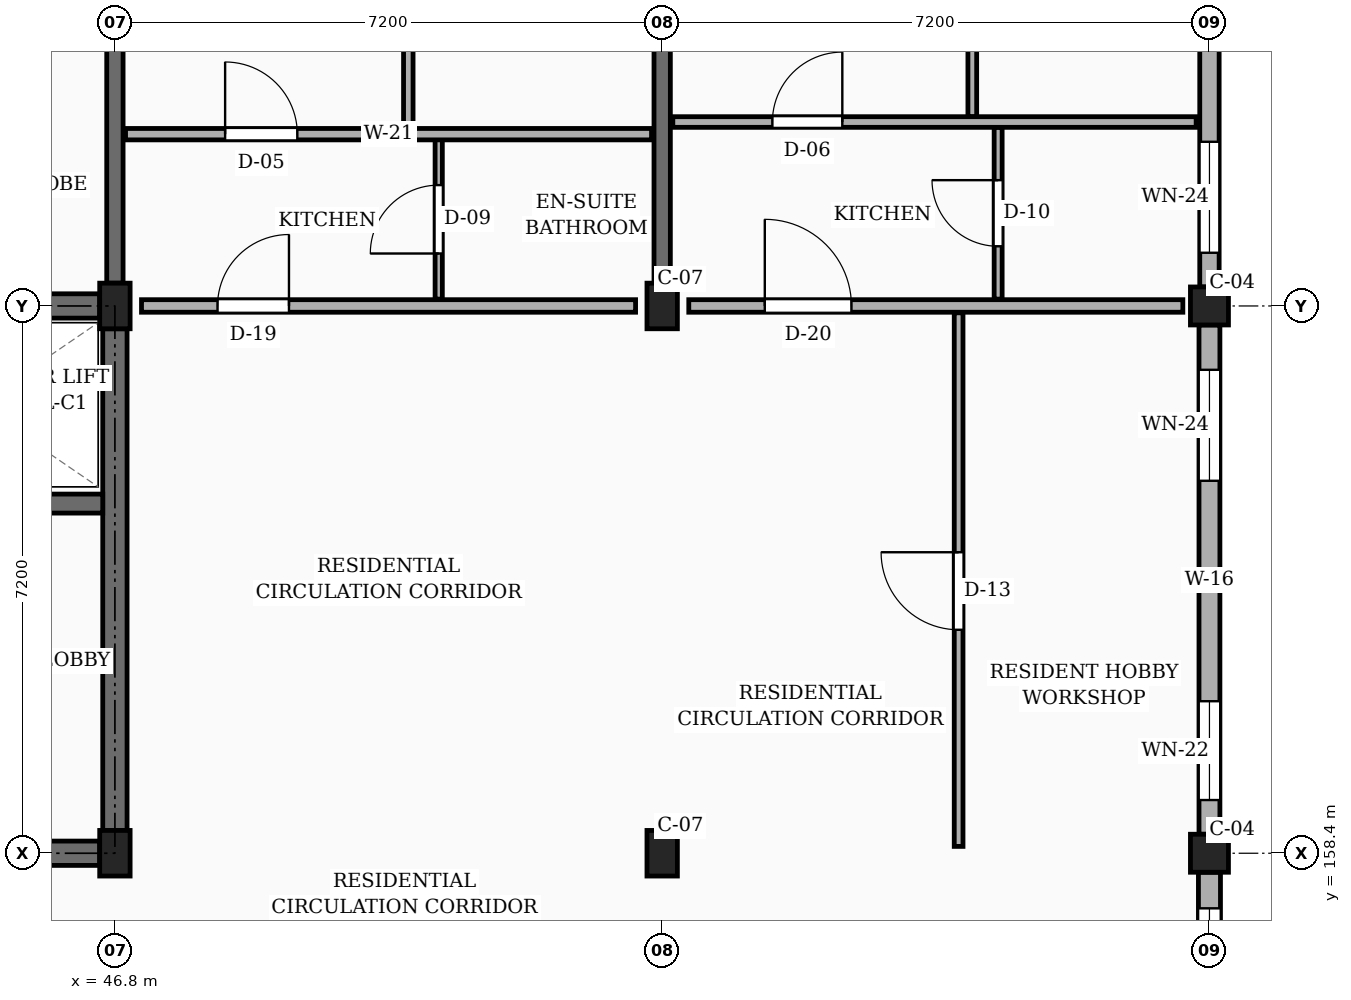
"""IFC4 building model, lengths in metres.
Left out: names, types, materials, properties, quantities, classifications, styles, units other than length and angle.
Written with IfcOpenShell. Run it as: python <this file> out.ifc"""

import sys

from ifc_helpers import new_model, si_unit, direction, frame, frame_2d, origin, origin_2d, place, context, subcontext, project, spatial, rectangle, extrude, element, fill, save


model = new_model("IFC4")
c1 = context("Model", 3, precision=1e-05, world=origin(), true_north=direction((0.0, 1.0)))
c2 = subcontext(c1, "Body", "Model", "MODEL_VIEW")
j1 = project(units=[si_unit("LENGTHUNIT", "METRE"), si_unit("PLANEANGLEUNIT", "RADIAN")], contexts=[c1])
p1 = place(None, origin())
s1 = spatial("IfcSite", under=j1, at=p1, CompositionType="ELEMENT")
p2 = place(p1, origin())
s2 = spatial("IfcBuilding", under=s1, at=p2, CompositionType="ELEMENT")
p3 = place(p2, frame((0.0, 0.0, 29.7)))
s3 = spatial("IfcBuildingStorey", under=s2, at=p3, CompositionType="ELEMENT", Elevation=29.7)
for number, where, z_axis, x_axis in (
    (1, (46.8, 158.4, 0.0), (0.0, 0.0, 1.0), (1.0, 0.0, 0.0)),
    (2, (46.8, 165.6, 0.0), (0.0, 0.0, 1.0), (1.0, 0.0, 0.0)),
    (3, (54.0, 158.4, 0.0), (0.0, 0.0, 1.0), (1.0, 0.0, 0.0)),
    (4, (54.0, 165.6, 0.0), (0.0, 0.0, 1.0), (1.0, 0.0, 0.0)),
):
    element("IfcColumn", number, at=place(p3, frame(where, z_axis=z_axis, x_axis=x_axis)), inside=s3, PredefinedType="COLUMN", context=c2, shape_type="SweptSolid", body=[
        extrude(rectangle(XDim=0.4, YDim=0.6, at=origin_2d()), origin(), (0.0, 0.0, 1.0), 3.15),
    ])
for number, where, z_axis, x_axis in (
    (5, (61.2, 158.4, 0.0), (0.0, 0.0, 1.0), (1.0, 0.0, 0.0)),
    (6, (61.2, 165.6, 0.0), (0.0, 0.0, 1.0), (1.0, 0.0, 0.0)),
):
    element("IfcColumn", number, at=place(p3, frame(where, z_axis=z_axis, x_axis=x_axis)), inside=s3, PredefinedType="COLUMN", context=c2, shape_type="SweptSolid", body=[
        extrude(rectangle(XDim=0.5, YDim=0.5, at=origin_2d()), origin(), (0.0, 0.0, 1.0), 3.15),
    ])
for number, where, z_axis, x_axis in (
    (7, (46.8, 165.9, 0.0), (0.0, 0.0, 1.0), (0.0, 1.0, 0.0)),
    (8, (54.0, 165.9, 0.0), (0.0, 0.0, 1.0), (0.0, 1.0, 0.0)),
):
    element("IfcWall", number, at=place(p3, frame(where, z_axis=z_axis, x_axis=x_axis)), inside=s3, PredefinedType="SOLIDWALL", context=c2, shape_type="SweptSolid", body=[
        extrude(rectangle(XDim=6.65, YDim=0.215, at=frame_2d((3.325, 0.0))), origin(), (0.0, 0.0, 1.0), 2.185),
    ])
p4 = place(p3, frame((61.2, 151.45, 0.0), z_axis=(0.0, 0.0, 1.0), x_axis=(0.0, 1.0, 0.0)))
e9 = element("IfcWall", 9, at=p4, inside=s3, PredefinedType="SOLIDWALL", context=c2, shape_type="SweptSolid", body=[
    extrude(rectangle(XDim=6.7, YDim=0.29, at=frame_2d((3.35, 0.0))), origin(), (0.0, 0.0, 1.0), 2.455),
])
p5 = place(p4, frame((0.49, 0.0, 0.78)))
e10 = element("IfcOpeningElement", 10, at=p5, cuts=e9, PredefinedType="OPENING", context=c2, shape_type="SweptSolid", body=[
    extrude(rectangle(XDim=1.06, YDim=1.36, at=frame_2d((0.53, 0.68))), frame((0.0, 0.155, 0.0), z_axis=(0.0, -1.0, 0.0), x_axis=(1.0, 0.0, 0.0)), (0.0, 0.0, 1.0), 0.31),
])
p6 = place(p4, frame((2.765, 0.0, 0.78)))
e11 = element("IfcOpeningElement", 11, at=p6, cuts=e9, PredefinedType="OPENING", context=c2, shape_type="SweptSolid", body=[
    extrude(rectangle(XDim=1.22, YDim=1.36, at=frame_2d((0.61, 0.68))), frame((0.0, 0.155, 0.0), z_axis=(0.0, -1.0, 0.0), x_axis=(1.0, 0.0, 0.0)), (0.0, 0.0, 1.0), 0.31),
])
p7 = place(p4, frame((5.185, 0.0, 0.78)))
e12 = element("IfcOpeningElement", 12, at=p7, cuts=e9, PredefinedType="OPENING", context=c2, shape_type="SweptSolid", body=[
    extrude(rectangle(XDim=1.04, YDim=1.26, at=frame_2d((0.52, 0.63))), frame((0.0, 0.155, 0.0), z_axis=(0.0, -1.0, 0.0), x_axis=(1.0, 0.0, 0.0)), (0.0, 0.0, 1.0), 0.31),
])
p8 = place(p3, frame((61.2, 158.65, 0.0), z_axis=(0.0, 0.0, 1.0), x_axis=(0.0, 1.0, 0.0)))
e13 = element("IfcWall", 13, at=p8, inside=s3, PredefinedType="SOLIDWALL", context=c2, shape_type="SweptSolid", body=[
    extrude(rectangle(XDim=6.7, YDim=0.275, at=frame_2d((3.35, 0.0))), origin(), (0.0, 0.0, 1.0), 2.455),
])
p9 = place(p8, frame((0.45, 0.0, 0.78)))
e14 = element("IfcOpeningElement", 14, at=p9, cuts=e13, PredefinedType="OPENING", context=c2, shape_type="SweptSolid", body=[
    extrude(rectangle(XDim=1.3, YDim=1.36, at=frame_2d((0.65, 0.68))), frame((0.0, 0.147, 0.0), z_axis=(0.0, -1.0, 0.0), x_axis=(1.0, 0.0, 0.0)), (0.0, 0.0, 1.0), 0.295),
])
p10 = place(p8, frame((4.65, 0.0, 0.78)))
e15 = element("IfcOpeningElement", 15, at=p10, cuts=e13, PredefinedType="OPENING", context=c2, shape_type="SweptSolid", body=[
    extrude(rectangle(XDim=1.46, YDim=1.36, at=frame_2d((0.73, 0.68))), frame((0.0, 0.147, 0.0), z_axis=(0.0, -1.0, 0.0), x_axis=(1.0, 0.0, 0.0)), (0.0, 0.0, 1.0), 0.295),
])
p11 = place(p3, frame((61.2, 165.85, 0.0), z_axis=(0.0, 0.0, 1.0), x_axis=(0.0, 1.0, 0.0)))
e16 = element("IfcWall", 16, at=p11, inside=s3, PredefinedType="SOLIDWALL", context=c2, shape_type="SweptSolid", body=[
    extrude(rectangle(XDim=6.7, YDim=0.255, at=frame_2d((3.35, 0.0))), origin(), (0.0, 0.0, 1.0), 2.455),
])
p12 = place(p11, frame((0.45, 0.0, 0.78)))
e17 = element("IfcOpeningElement", 17, at=p12, cuts=e16, PredefinedType="OPENING", context=c2, shape_type="SweptSolid", body=[
    extrude(rectangle(XDim=1.46, YDim=1.36, at=frame_2d((0.73, 0.68))), frame((0.0, 0.137, 0.0), z_axis=(0.0, -1.0, 0.0), x_axis=(1.0, 0.0, 0.0)), (0.0, 0.0, 1.0), 0.275),
])
p13 = place(p11, frame((4.65, 0.0, 0.78)))
e18 = element("IfcOpeningElement", 18, at=p13, cuts=e16, PredefinedType="OPENING", context=c2, shape_type="SweptSolid", body=[
    extrude(rectangle(XDim=1.05, YDim=1.44, at=frame_2d((0.525, 0.72))), frame((0.0, 0.137, 0.0), z_axis=(0.0, -1.0, 0.0), x_axis=(1.0, 0.0, 0.0)), (0.0, 0.0, 1.0), 0.275),
])
p14 = place(p3, frame((39.8, 165.6, 0.0), z_axis=(0.0, 0.0, 1.0), x_axis=(1.0, 0.0, 0.0)))
e19 = element("IfcWall", 19, at=p14, inside=s3, PredefinedType="SHEAR", context=c2, shape_type="SweptSolid", body=[
    extrude(rectangle(XDim=6.8, YDim=0.32, at=frame_2d((3.4, 0.0))), origin(), (0.0, 0.0, 1.0), 2.885),
])
p15 = place(p3, frame((46.8, 158.7, 0.0), z_axis=(0.0, 0.0, 1.0), x_axis=(0.0, 1.0, 0.0)))
e20 = element("IfcWall", 20, at=p15, inside=s3, PredefinedType="SHEAR", context=c2, shape_type="SweptSolid", body=[
    extrude(rectangle(XDim=6.6, YDim=0.32, at=frame_2d((3.3, 0.0))), origin(), (0.0, 0.0, 1.0), 2.885),
])
p16 = place(p3, frame((39.8, 158.4, 0.0), z_axis=(0.0, 0.0, 1.0), x_axis=(1.0, 0.0, 0.0)))
e21 = element("IfcWall", 21, at=p16, inside=s3, PredefinedType="SHEAR", context=c2, shape_type="SweptSolid", body=[
    extrude(rectangle(XDim=6.8, YDim=0.32, at=frame_2d((3.4, 0.0))), origin(), (0.0, 0.0, 1.0), 2.885),
])
p17 = place(p16, frame((4.55, 0.0, 0.0)))
e22 = element("IfcOpeningElement", 22, at=p17, cuts=e21, PredefinedType="OPENING", context=c2, shape_type="SweptSolid", body=[
    extrude(rectangle(XDim=1.1, YDim=2.15, at=frame_2d((0.55, 1.075))), frame((0.0, 0.17, 0.0), z_axis=(0.0, -1.0, 0.0), x_axis=(1.0, 0.0, 0.0)), (0.0, 0.0, 1.0), 0.34),
])
p18 = place(p3, frame((43.325, 163.0, 0.0), z_axis=(0.0, 0.0, 1.0), x_axis=(1.0, 0.0, 0.0)))
e23 = element("IfcWall", 23, at=p18, inside=s3, PredefinedType="SHEAR", context=c2, shape_type="SweptSolid", body=[
    extrude(rectangle(XDim=3.315, YDim=0.25, at=frame_2d((1.657, 0.0))), origin(), (0.0, 0.0, 1.0), 2.885),
])
p19 = place(p18, frame((1.1, 0.0, 0.0)))
e24 = element("IfcOpeningElement", 24, at=p19, cuts=e23, PredefinedType="OPENING", context=c2, shape_type="SweptSolid", body=[
    extrude(rectangle(XDim=1.0, YDim=2.2, at=frame_2d((0.5, 1.1))), frame((0.0, 0.135, 0.0), z_axis=(0.0, -1.0, 0.0), x_axis=(1.0, 0.0, 0.0)), (0.0, 0.0, 1.0), 0.27),
])
p20 = place(p3, frame((47.15, 165.6, 0.0), z_axis=(0.0, 0.0, 1.0), x_axis=(1.0, 0.0, 0.0)))
e25 = element("IfcWall", 25, at=p20, inside=s3, PredefinedType="PARTITIONING", context=c2, shape_type="SweptSolid", body=[
    extrude(rectangle(XDim=6.5, YDim=0.165, at=frame_2d((3.25, 0.0))), origin(), (0.0, 0.0, 1.0), 2.32),
])
p21 = place(p20, frame((1.0, 0.0, 0.0)))
e26 = element("IfcOpeningElement", 26, at=p21, cuts=e25, PredefinedType="OPENING", context=c2, shape_type="SweptSolid", body=[
    extrude(rectangle(XDim=0.94, YDim=2.12, at=frame_2d((0.47, 1.06))), frame((0.0, 0.093, 0.0), z_axis=(0.0, -1.0, 0.0), x_axis=(1.0, 0.0, 0.0)), (0.0, 0.0, 1.0), 0.185),
])
p22 = place(p3, frame((54.35, 165.6, 0.0), z_axis=(0.0, 0.0, 1.0), x_axis=(1.0, 0.0, 0.0)))
e27 = element("IfcWall", 27, at=p22, inside=s3, PredefinedType="PARTITIONING", context=c2, shape_type="SweptSolid", body=[
    extrude(rectangle(XDim=6.5, YDim=0.165, at=frame_2d((3.25, 0.0))), origin(), (0.0, 0.0, 1.0), 2.32),
])
p23 = place(p22, frame((1.0, 0.0, 0.0)))
e28 = element("IfcOpeningElement", 28, at=p23, cuts=e27, PredefinedType="OPENING", context=c2, shape_type="SweptSolid", body=[
    extrude(rectangle(XDim=1.14, YDim=2.18, at=frame_2d((0.57, 1.09))), frame((0.0, 0.093, 0.0), z_axis=(0.0, -1.0, 0.0), x_axis=(1.0, 0.0, 0.0)), (0.0, 0.0, 1.0), 0.185),
])
p24 = place(p3, frame((50.66, 167.93, 0.0), z_axis=(0.0, 0.0, 1.0), x_axis=(0.0, 1.0, 0.0)))
e29 = element("IfcWall", 29, at=p24, inside=s3, PredefinedType="PARTITIONING", context=c2, shape_type="SweptSolid", body=[
    extrude(rectangle(XDim=4.695, YDim=0.125, at=frame_2d((2.348, 0.0))), origin(), (0.0, 0.0, 1.0), 2.32),
])
p25 = place(p24, frame((1.897, 0.0, 0.0)))
e30 = element("IfcOpeningElement", 30, at=p25, cuts=e29, PredefinedType="OPENING", context=c2, shape_type="SweptSolid", body=[
    extrude(rectangle(XDim=0.9, YDim=2.1, at=frame_2d((0.45, 1.05))), frame((0.0, 0.073, 0.0), z_axis=(0.0, -1.0, 0.0), x_axis=(1.0, 0.0, 0.0)), (0.0, 0.0, 1.0), 0.145),
])
p26 = place(p3, frame((51.06, 165.69, 0.0), z_axis=(0.0, 0.0, 1.0), x_axis=(0.0, 1.0, 0.0)))
e31 = element("IfcWall", 31, at=p26, inside=s3, PredefinedType="PARTITIONING", context=c2, shape_type="SweptSolid", body=[
    extrude(rectangle(XDim=2.1, YDim=0.095, at=frame_2d((1.05, 0.0))), origin(), (0.0, 0.0, 1.0), 2.32),
])
p27 = place(p26, frame((0.6, 0.0, 0.0)))
e32 = element("IfcOpeningElement", 32, at=p27, cuts=e31, PredefinedType="OPENING", context=c2, shape_type="SweptSolid", body=[
    extrude(rectangle(XDim=0.9, YDim=2.05, at=frame_2d((0.45, 1.025))), frame((0.0, 0.058, 0.0), z_axis=(0.0, -1.0, 0.0), x_axis=(1.0, 0.0, 0.0)), (0.0, 0.0, 1.0), 0.115),
])
p28 = place(p3, frame((46.94, 167.86, 0.0), z_axis=(0.0, 0.0, 1.0), x_axis=(1.0, 0.0, 0.0)))
e33 = element("IfcWall", 33, at=p28, inside=s3, PredefinedType="PARTITIONING", context=c2, shape_type="SweptSolid", body=[
    extrude(rectangle(XDim=6.92, YDim=0.15, at=frame_2d((3.46, 0.0))), origin(), (0.0, 0.0, 1.0), 2.32),
])
p29 = place(p28, frame((1.31, 0.0, 0.0)))
e34 = element("IfcOpeningElement", 34, at=p29, cuts=e33, PredefinedType="OPENING", context=c2, shape_type="SweptSolid", body=[
    extrude(rectangle(XDim=0.95, YDim=2.1, at=frame_2d((0.475, 1.05))), frame((0.0, 0.085, 0.0), z_axis=(0.0, -1.0, 0.0), x_axis=(1.0, 0.0, 0.0)), (0.0, 0.0, 1.0), 0.17),
])
p30 = place(p3, frame((57.9, 158.49, 0.0), z_axis=(0.0, 0.0, 1.0), x_axis=(0.0, 1.0, 0.0)))
e35 = element("IfcWall", 35, at=p30, inside=s3, PredefinedType="PARTITIONING", context=c2, shape_type="SweptSolid", body=[
    extrude(rectangle(XDim=7.02, YDim=0.115, at=frame_2d((3.51, 0.0))), origin(), (0.0, 0.0, 1.0), 2.32),
])
p31 = place(p30, frame((2.85, 0.0, 0.0)))
e36 = element("IfcOpeningElement", 36, at=p31, cuts=e35, PredefinedType="OPENING", context=c2, shape_type="SweptSolid", body=[
    extrude(rectangle(XDim=1.02, YDim=2.15, at=frame_2d((0.51, 1.075))), frame((0.0, 0.067, 0.0), z_axis=(0.0, -1.0, 0.0), x_axis=(1.0, 0.0, 0.0)), (0.0, 0.0, 1.0), 0.135),
])
p32 = place(p3, frame((58.08, 168.09, 0.0), z_axis=(0.0, 0.0, 1.0), x_axis=(0.0, 1.0, 0.0)))
e37 = element("IfcWall", 37, at=p32, inside=s3, PredefinedType="PARTITIONING", context=c2, shape_type="SweptSolid", body=[
    extrude(rectangle(XDim=4.535, YDim=0.115, at=frame_2d((2.268, 0.0))), origin(), (0.0, 0.0, 1.0), 2.32),
])
p33 = place(p32, frame((1.827, 0.0, 0.0)))
e38 = element("IfcOpeningElement", 38, at=p33, cuts=e37, PredefinedType="OPENING", context=c2, shape_type="SweptSolid", body=[
    extrude(rectangle(XDim=0.88, YDim=2.08, at=frame_2d((0.44, 1.04))), frame((0.0, 0.067, 0.0), z_axis=(0.0, -1.0, 0.0), x_axis=(1.0, 0.0, 0.0)), (0.0, 0.0, 1.0), 0.135),
])
p34 = place(p3, frame((58.42, 165.69, 0.0), z_axis=(0.0, 0.0, 1.0), x_axis=(0.0, 1.0, 0.0)))
e39 = element("IfcWall", 39, at=p34, inside=s3, PredefinedType="PARTITIONING", context=c2, shape_type="SweptSolid", body=[
    extrude(rectangle(XDim=2.26, YDim=0.105, at=frame_2d((1.13, 0.0))), origin(), (0.0, 0.0, 1.0), 2.32),
])
p35 = place(p34, frame((0.695, 0.0, 0.0)))
e40 = element("IfcOpeningElement", 40, at=p35, cuts=e39, PredefinedType="OPENING", context=c2, shape_type="SweptSolid", body=[
    extrude(rectangle(XDim=0.87, YDim=2.05, at=frame_2d((0.435, 1.025))), frame((0.0, 0.062, 0.0), z_axis=(0.0, -1.0, 0.0), x_axis=(1.0, 0.0, 0.0)), (0.0, 0.0, 1.0), 0.125),
])
p36 = place(p3, frame((54.14, 168.02, 0.0), z_axis=(0.0, 0.0, 1.0), x_axis=(1.0, 0.0, 0.0)))
e41 = element("IfcWall", 41, at=p36, inside=s3, PredefinedType="PARTITIONING", context=c2, shape_type="SweptSolid", body=[
    extrude(rectangle(XDim=6.885, YDim=0.14, at=frame_2d((3.442, 0.0))), origin(), (0.0, 0.0, 1.0), 2.32),
])
p37 = place(p36, frame((1.31, 0.0, 0.0)))
e42 = element("IfcOpeningElement", 42, at=p37, cuts=e41, PredefinedType="OPENING", context=c2, shape_type="SweptSolid", body=[
    extrude(rectangle(XDim=0.92, YDim=2.1, at=frame_2d((0.46, 1.05))), frame((0.0, 0.08, 0.0), z_axis=(0.0, -1.0, 0.0), x_axis=(1.0, 0.0, 0.0)), (0.0, 0.0, 1.0), 0.16),
])
p38 = place(p7, origin())
e43 = element("IfcWindow", 43, at=p38, inside=s3, PartitioningType="SINGLE_PANEL", PredefinedType="WINDOW", context=c2, shape_type="SweptSolid", body=[
    extrude(rectangle(XDim=1.04, YDim=1.26, at=frame_2d((0.52, 0.63))), frame((0.0, 0.03, 0.0), z_axis=(0.0, -1.0, 0.0), x_axis=(1.0, 0.0, 0.0)), (0.0, 0.0, 1.0), 0.06),
])
fill(e12, e43)
p39 = place(p9, origin())
e44 = element("IfcWindow", 44, at=p39, inside=s3, PartitioningType="SINGLE_PANEL", PredefinedType="WINDOW", context=c2, shape_type="SweptSolid", body=[
    extrude(rectangle(XDim=1.3, YDim=1.36, at=frame_2d((0.65, 0.68))), frame((0.0, 0.03, 0.0), z_axis=(0.0, -1.0, 0.0), x_axis=(1.0, 0.0, 0.0)), (0.0, 0.0, 1.0), 0.06),
])
fill(e14, e44)
p40 = place(p10, origin())
e45 = element("IfcWindow", 45, at=p40, inside=s3, PartitioningType="SINGLE_PANEL", PredefinedType="WINDOW", context=c2, shape_type="SweptSolid", body=[
    extrude(rectangle(XDim=1.46, YDim=1.36, at=frame_2d((0.73, 0.68))), frame((0.0, 0.03, 0.0), z_axis=(0.0, -1.0, 0.0), x_axis=(1.0, 0.0, 0.0)), (0.0, 0.0, 1.0), 0.06),
])
fill(e15, e45)
p41 = place(p12, origin())
e46 = element("IfcWindow", 46, at=p41, inside=s3, PartitioningType="SINGLE_PANEL", PredefinedType="WINDOW", context=c2, shape_type="SweptSolid", body=[
    extrude(rectangle(XDim=1.46, YDim=1.36, at=frame_2d((0.73, 0.68))), frame((0.0, 0.03, 0.0), z_axis=(0.0, -1.0, 0.0), x_axis=(1.0, 0.0, 0.0)), (0.0, 0.0, 1.0), 0.06),
])
fill(e17, e46)
p42 = place(p21, origin())
e47 = element("IfcDoor", 47, at=p42, inside=s3, OperationType="SINGLE_SWING_RIGHT", PredefinedType="DOOR", context=c2, shape_type="SweptSolid", body=[
    extrude(rectangle(XDim=0.94, YDim=2.12, at=frame_2d((0.47, 1.06))), frame((0.0, 0.025, 0.0), z_axis=(0.0, -1.0, 0.0), x_axis=(1.0, 0.0, 0.0)), (0.0, 0.0, 1.0), 0.05),
])
fill(e26, e47)
p43 = place(p23, origin())
e48 = element("IfcDoor", 48, at=p43, inside=s3, OperationType="SINGLE_SWING_LEFT", PredefinedType="DOOR", context=c2, shape_type="SweptSolid", body=[
    extrude(rectangle(XDim=1.14, YDim=2.18, at=frame_2d((0.57, 1.09))), frame((0.0, 0.025, 0.0), z_axis=(0.0, -1.0, 0.0), x_axis=(1.0, 0.0, 0.0)), (0.0, 0.0, 1.0), 0.05),
])
fill(e28, e48)
p44 = place(p27, origin())
e49 = element("IfcDoor", 49, at=p44, inside=s3, OperationType="SINGLE_SWING_LEFT", PredefinedType="DOOR", context=c2, shape_type="SweptSolid", body=[
    extrude(rectangle(XDim=0.9, YDim=2.05, at=frame_2d((0.45, 1.025))), frame((0.0, 0.025, 0.0), z_axis=(0.0, -1.0, 0.0), x_axis=(1.0, 0.0, 0.0)), (0.0, 0.0, 1.0), 0.05),
])
fill(e32, e49)
p45 = place(p29, origin())
e50 = element("IfcDoor", 50, at=p45, inside=s3, OperationType="SINGLE_SWING_LEFT", PredefinedType="DOOR", context=c2, shape_type="SweptSolid", body=[
    extrude(rectangle(XDim=0.95, YDim=2.1, at=frame_2d((0.475, 1.05))), frame((0.0, 0.025, 0.0), z_axis=(0.0, -1.0, 0.0), x_axis=(1.0, 0.0, 0.0)), (0.0, 0.0, 1.0), 0.05),
])
fill(e34, e50)
p46 = place(p31, origin())
e51 = element("IfcDoor", 51, at=p46, inside=s3, OperationType="SINGLE_SWING_RIGHT", PredefinedType="DOOR", context=c2, shape_type="SweptSolid", body=[
    extrude(rectangle(XDim=1.02, YDim=2.15, at=frame_2d((0.51, 1.075))), frame((0.0, 0.025, 0.0), z_axis=(0.0, -1.0, 0.0), x_axis=(1.0, 0.0, 0.0)), (0.0, 0.0, 1.0), 0.05),
])
fill(e36, e51)
p47 = place(p35, origin())
e52 = element("IfcDoor", 52, at=p47, inside=s3, OperationType="SINGLE_SWING_RIGHT", PredefinedType="DOOR", context=c2, shape_type="SweptSolid", body=[
    extrude(rectangle(XDim=0.87, YDim=2.05, at=frame_2d((0.435, 1.025))), frame((0.0, 0.025, 0.0), z_axis=(0.0, -1.0, 0.0), x_axis=(1.0, 0.0, 0.0)), (0.0, 0.0, 1.0), 0.05),
])
fill(e40, e52)
p48 = place(p37, origin())
e53 = element("IfcDoor", 53, at=p48, inside=s3, OperationType="SINGLE_SWING_RIGHT", PredefinedType="DOOR", context=c2, shape_type="SweptSolid", body=[
    extrude(rectangle(XDim=0.92, YDim=2.1, at=frame_2d((0.46, 1.05))), frame((0.0, 0.025, 0.0), z_axis=(0.0, -1.0, 0.0), x_axis=(1.0, 0.0, 0.0)), (0.0, 0.0, 1.0), 0.05),
])
fill(e42, e53)
save(model, sys.argv[1])
